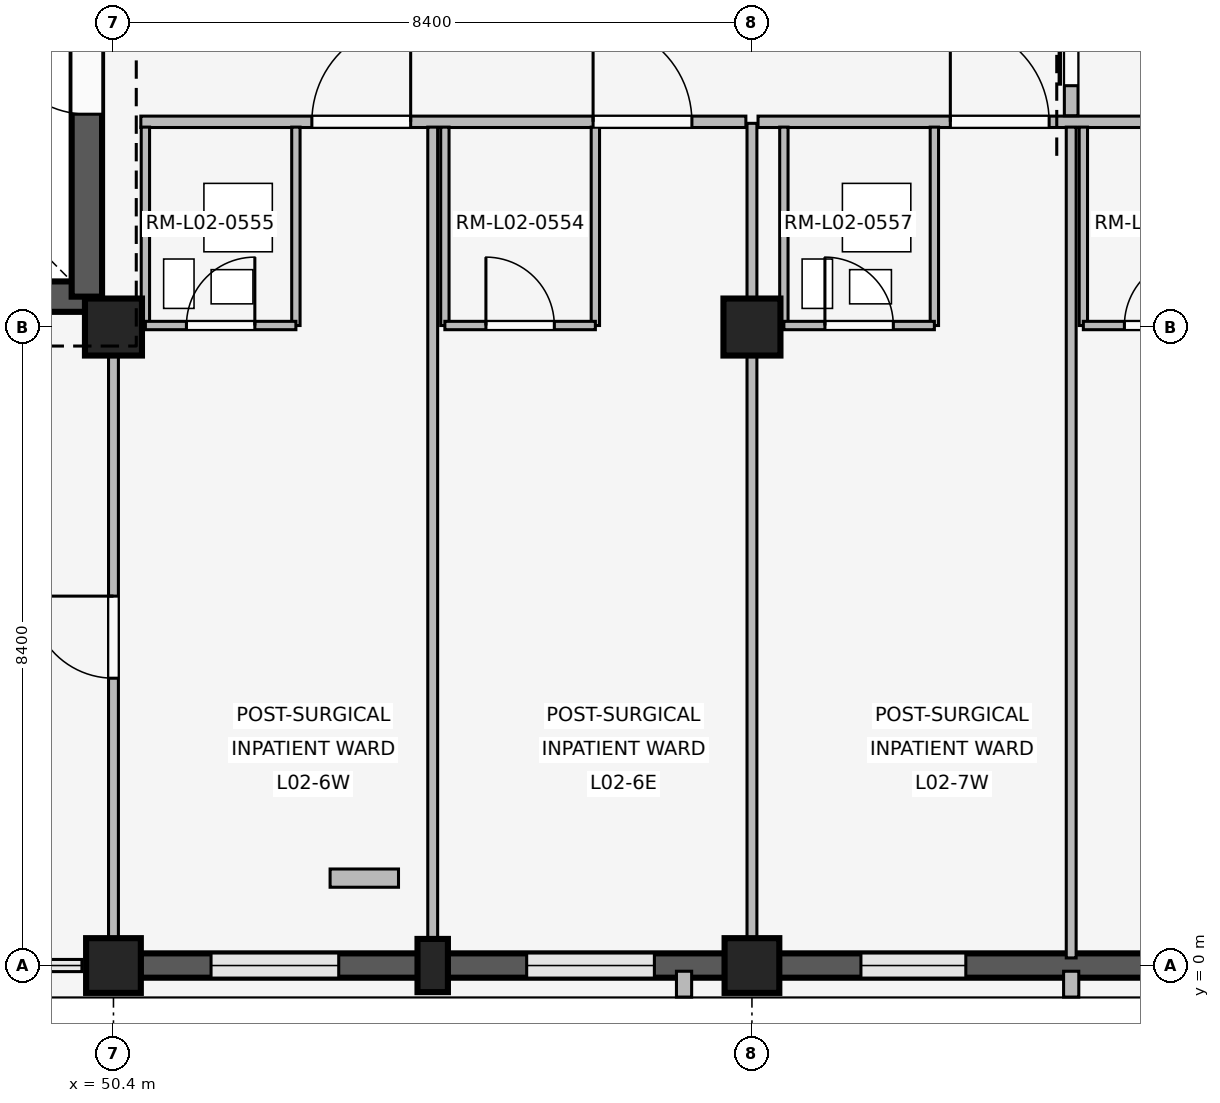
"""IFC4 building model, lengths in metres.
Left out: names, types, materials, properties, quantities, classifications, styles, units other than length and angle.
Written with IfcOpenShell. Run it as: python <this file> out.ifc"""

import sys

from ifc_helpers import new_model, si_unit, direction, frame, frame_2d, origin, origin_2d, place, context, subcontext, project, spatial, rectangle, extrude, element, fill, save


model = new_model("IFC4")
c1 = context("Model", 3, precision=1e-05, world=origin(), true_north=direction((0.0, 1.0)))
c2 = subcontext(c1, "Body", "Model", "MODEL_VIEW")
j1 = project(units=[si_unit("LENGTHUNIT", "METRE"), si_unit("PLANEANGLEUNIT", "RADIAN")], contexts=[c1])
p1 = place(None, origin())
s1 = spatial("IfcSite", under=j1, at=p1, CompositionType="ELEMENT")
p2 = place(p1, origin())
s2 = spatial("IfcBuilding", under=s1, at=p2, CompositionType="ELEMENT")
p3 = place(p2, frame((0.0, 0.0, 8.1)))
s3 = spatial("IfcBuildingStorey", under=s2, at=p3, CompositionType="ELEMENT", Elevation=8.1)
p4 = place(p3, frame((50.4, 0.0, 0.0), z_axis=(0.0, 0.0, 1.0), x_axis=(1.0, 0.0, 0.0)))
e1 = element("IfcColumn", 1, at=p4, inside=s3, PredefinedType="COLUMN", context=c2, shape_type="SweptSolid", body=[
    extrude(rectangle(XDim=0.72, YDim=0.72, at=origin_2d()), origin(), (0.0, 0.0, 1.0), 4.8),
])
p5 = place(p3, frame((50.4, 8.4, 0.0), z_axis=(0.0, 0.0, 1.0), x_axis=(1.0, 0.0, 0.0)))
e2 = element("IfcColumn", 2, at=p5, inside=s3, PredefinedType="COLUMN", context=c2, shape_type="SweptSolid", body=[
    extrude(rectangle(XDim=0.75, YDim=0.75, at=origin_2d()), origin(), (0.0, 0.0, 1.0), 4.8),
])
p6 = place(p3, frame((58.8, 0.0, 0.0), z_axis=(0.0, 0.0, 1.0), x_axis=(1.0, 0.0, 0.0)))
e3 = element("IfcColumn", 3, at=p6, inside=s3, PredefinedType="COLUMN", context=c2, shape_type="SweptSolid", body=[
    extrude(rectangle(XDim=0.72, YDim=0.72, at=origin_2d()), origin(), (0.0, 0.0, 1.0), 4.8),
])
p7 = place(p3, frame((58.8, 8.4, 0.0), z_axis=(0.0, 0.0, 1.0), x_axis=(1.0, 0.0, 0.0)))
e4 = element("IfcColumn", 4, at=p7, inside=s3, PredefinedType="COLUMN", context=c2, shape_type="SweptSolid", body=[
    extrude(rectangle(XDim=0.75, YDim=0.75, at=origin_2d()), origin(), (0.0, 0.0, 1.0), 4.8),
])
p8 = place(p3, frame((54.6, 0.0, 0.0), z_axis=(0.0, 0.0, 1.0), x_axis=(1.0, 0.0, 0.0)))
e5 = element("IfcColumn", 5, at=p8, inside=s3, PredefinedType="PILASTER", context=c2, shape_type="SweptSolid", body=[
    extrude(rectangle(XDim=0.4, YDim=0.7, at=origin_2d()), origin(), (0.0, 0.0, 1.0), 4.8),
])
p9 = place(p3, frame((58.445, 0.0, 0.0), z_axis=(0.0, 0.0, 1.0), x_axis=(-1.0, 0.0, 0.0)))
e6 = element("IfcWall", 6, at=p9, inside=s3, PredefinedType="SOLIDWALL", context=c2, shape_type="SweptSolid", body=[
    extrude(rectangle(XDim=7.69, YDim=0.32, at=frame_2d((3.845, 0.0))), origin(), (0.0, 0.0, 1.0), 3.86),
])
p10 = place(p9, frame((0.929, 0.0, 0.85)))
e7 = element("IfcOpeningElement", 7, at=p10, cuts=e6, PredefinedType="OPENING", context=c2, shape_type="SweptSolid", body=[
    extrude(rectangle(XDim=1.68, YDim=2.05, at=frame_2d((0.84, 1.025))), frame((0.0, 0.17, 0.0), z_axis=(0.0, -1.0, 0.0), x_axis=(1.0, 0.0, 0.0)), (0.0, 0.0, 1.0), 0.34),
])
p11 = place(p9, frame((5.081, 0.0, 0.85)))
e8 = element("IfcOpeningElement", 8, at=p11, cuts=e6, PredefinedType="OPENING", context=c2, shape_type="SweptSolid", body=[
    extrude(rectangle(XDim=1.68, YDim=2.05, at=frame_2d((0.84, 1.025))), frame((0.0, 0.17, 0.0), z_axis=(0.0, -1.0, 0.0), x_axis=(1.0, 0.0, 0.0)), (0.0, 0.0, 1.0), 0.34),
])
p12 = place(p3, frame((57.907, -0.075, 0.0), z_axis=(0.0, 0.0, 1.0), x_axis=(0.0, -1.0, 0.0)))
e9 = element("IfcWall", 9, at=p12, inside=s3, PredefinedType="ELEMENTEDWALL", context=c2, shape_type="SweptSolid", body=[
    extrude(rectangle(XDim=0.34, YDim=0.2, at=frame_2d((0.17, 0.0))), origin(), (0.0, 0.0, 1.0), 3.84),
])
p13 = place(p3, frame((66.845, 0.0, 0.0), z_axis=(0.0, 0.0, 1.0), x_axis=(-1.0, 0.0, 0.0)))
e10 = element("IfcWall", 10, at=p13, inside=s3, PredefinedType="SOLIDWALL", context=c2, shape_type="SweptSolid", body=[
    extrude(rectangle(XDim=7.69, YDim=0.32, at=frame_2d((3.845, 0.0))), origin(), (0.0, 0.0, 1.0), 3.86),
])
p14 = place(p13, frame((1.079, 0.0, 0.85)))
e11 = element("IfcOpeningElement", 11, at=p14, cuts=e10, PredefinedType="OPENING", context=c2, shape_type="SweptSolid", body=[
    extrude(rectangle(XDim=1.38, YDim=1.5, at=frame_2d((0.69, 0.75))), frame((0.0, 0.17, 0.0), z_axis=(0.0, -1.0, 0.0), x_axis=(1.0, 0.0, 0.0)), (0.0, 0.0, 1.0), 0.34),
])
p15 = place(p13, frame((5.231, 0.0, 0.85)))
e12 = element("IfcOpeningElement", 12, at=p15, cuts=e10, PredefinedType="OPENING", context=c2, shape_type="SweptSolid", body=[
    extrude(rectangle(XDim=1.38, YDim=1.5, at=frame_2d((0.69, 0.75))), frame((0.0, 0.17, 0.0), z_axis=(0.0, -1.0, 0.0), x_axis=(1.0, 0.0, 0.0)), (0.0, 0.0, 1.0), 0.34),
])
p16 = place(p3, frame((63.0, -0.075, 0.0), z_axis=(0.0, 0.0, 1.0), x_axis=(0.0, -1.0, 0.0)))
e13 = element("IfcWall", 13, at=p16, inside=s3, PredefinedType="ELEMENTEDWALL", context=c2, shape_type="SweptSolid", body=[
    extrude(rectangle(XDim=0.34, YDim=0.2, at=frame_2d((0.17, 0.0))), origin(), (0.0, 0.0, 1.0), 3.84),
])
p17 = place(p3, frame((42.55, 8.8, 0.0), z_axis=(0.0, 0.0, 1.0), x_axis=(1.0, 0.0, 0.0)))
e14 = element("IfcWall", 14, at=p17, inside=s3, PredefinedType="SHEAR", context=c2, shape_type="SweptSolid", body=[
    extrude(rectangle(XDim=7.5, YDim=0.4, at=frame_2d((3.75, 0.0))), origin(), (0.0, 0.0, 1.0), 4.52),
])
p18 = place(p17, frame((4.85, 0.0, 0.0)))
e15 = element("IfcOpeningElement", 15, at=p18, cuts=e14, PredefinedType="OPENING", context=c2, shape_type="SweptSolid", body=[
    extrude(rectangle(XDim=1.2, YDim=2.2, at=frame_2d((0.6, 1.1))), frame((0.0, 0.21, 0.0), z_axis=(0.0, -1.0, 0.0), x_axis=(1.0, 0.0, 0.0)), (0.0, 0.0, 1.0), 0.42),
])
p19 = place(p3, frame((50.05, 8.8, 0.0), z_axis=(0.0, 0.0, 1.0), x_axis=(0.0, 1.0, 0.0)))
e16 = element("IfcWall", 16, at=p19, inside=s3, PredefinedType="SHEAR", context=c2, shape_type="SweptSolid", body=[
    extrude(rectangle(XDim=7.55, YDim=0.4, at=frame_2d((3.775, 0.0))), origin(), (0.0, 0.0, 1.0), 4.52),
])
p20 = place(p19, frame((2.4, 0.0, 0.0)))
e17 = element("IfcOpeningElement", 17, at=p20, cuts=e16, PredefinedType="OPENING", context=c2, shape_type="SweptSolid", body=[
    extrude(rectangle(XDim=1.2, YDim=2.2, at=frame_2d((0.6, 1.1))), frame((0.0, 0.21, 0.0), z_axis=(0.0, -1.0, 0.0), x_axis=(1.0, 0.0, 0.0)), (0.0, 0.0, 1.0), 0.42),
])
p21 = place(p3, frame((50.4, 0.14, 0.0), z_axis=(0.0, 0.0, 1.0), x_axis=(0.0, 1.0, 0.0)))
e18 = element("IfcWall", 18, at=p21, inside=s3, PredefinedType="PARTITIONING", context=c2, shape_type="SweptSolid", body=[
    extrude(rectangle(XDim=8.21, YDim=0.13, at=frame_2d((4.105, 0.0))), origin(), (0.0, 0.0, 1.0), 3.84),
])
p22 = place(p21, frame((3.64, 0.0, 0.0)))
e19 = element("IfcOpeningElement", 19, at=p22, cuts=e18, PredefinedType="OPENING", context=c2, shape_type="SweptSolid", body=[
    extrude(rectangle(XDim=1.08, YDim=2.15, at=frame_2d((0.54, 1.075))), frame((0.0, 0.075, 0.0), z_axis=(0.0, -1.0, 0.0), x_axis=(1.0, 0.0, 0.0)), (0.0, 0.0, 1.0), 0.15),
])
p23 = place(p3, frame((50.76, 11.1, 0.0), z_axis=(0.0, 0.0, 1.0), x_axis=(1.0, 0.0, 0.0)))
e20 = element("IfcWall", 20, at=p23, inside=s3, PredefinedType="PARTITIONING", context=c2, shape_type="SweptSolid", body=[
    extrude(rectangle(XDim=7.96, YDim=0.15, at=frame_2d((3.98, 0.0))), origin(), (0.0, 0.0, 1.0), 3.84),
])
p24 = place(p23, frame((2.25, 0.0, 0.0)))
e21 = element("IfcOpeningElement", 21, at=p24, cuts=e20, PredefinedType="OPENING", context=c2, shape_type="SweptSolid", body=[
    extrude(rectangle(XDim=1.3, YDim=2.25, at=frame_2d((0.65, 1.125))), frame((0.0, 0.085, 0.0), z_axis=(0.0, -1.0, 0.0), x_axis=(1.0, 0.0, 0.0)), (0.0, 0.0, 1.0), 0.17),
])
p25 = place(p23, frame((5.95, 0.0, 0.0)))
e22 = element("IfcOpeningElement", 22, at=p25, cuts=e20, PredefinedType="OPENING", context=c2, shape_type="SweptSolid", body=[
    extrude(rectangle(XDim=1.3, YDim=2.25, at=frame_2d((0.65, 1.125))), frame((0.0, 0.085, 0.0), z_axis=(0.0, -1.0, 0.0), x_axis=(1.0, 0.0, 0.0)), (0.0, 0.0, 1.0), 0.17),
])
p26 = place(p3, frame((54.6, 0.1, 0.0), z_axis=(0.0, 0.0, 1.0), x_axis=(0.0, 1.0, 0.0)))
e23 = element("IfcWall", 23, at=p26, inside=s3, PredefinedType="PARTITIONING", context=c2, shape_type="SweptSolid", body=[
    extrude(rectangle(XDim=10.93, YDim=0.13, at=frame_2d((5.465, 0.0))), origin(), (0.0, 0.0, 1.0), 3.84),
])
for number, where, z_axis, x_axis in (
    (24, (50.82, 8.42, 0.0), (0.0, 0.0, 1.0), (0.0, 1.0, 0.0)),
    (25, (52.8, 8.42, 0.0), (0.0, 0.0, 1.0), (0.0, 1.0, 0.0)),
):
    element("IfcWall", number, at=place(p3, frame(where, z_axis=z_axis, x_axis=x_axis)), inside=s3, PredefinedType="PARTITIONING", context=c2, shape_type="SweptSolid", body=[
        extrude(rectangle(XDim=2.61, YDim=0.11, at=frame_2d((1.305, 0.0))), origin(), (0.0, 0.0, 1.0), 3.84),
    ])
p27 = place(p3, frame((50.82, 8.42, 0.0), z_axis=(0.0, 0.0, 1.0), x_axis=(1.0, 0.0, 0.0)))
e26 = element("IfcWall", 26, at=p27, inside=s3, PredefinedType="PARTITIONING", context=c2, shape_type="SweptSolid", body=[
    extrude(rectangle(XDim=1.98, YDim=0.11, at=frame_2d((0.99, 0.0))), origin(), (0.0, 0.0, 1.0), 3.84),
])
p28 = place(p27, frame((0.54, 0.0, 0.0)))
e27 = element("IfcOpeningElement", 27, at=p28, cuts=e26, PredefinedType="OPENING", context=c2, shape_type="SweptSolid", body=[
    extrude(rectangle(XDim=0.9, YDim=2.1, at=frame_2d((0.45, 1.05))), frame((0.0, 0.065, 0.0), z_axis=(0.0, -1.0, 0.0), x_axis=(1.0, 0.0, 0.0)), (0.0, 0.0, 1.0), 0.13),
])
for number, where, z_axis, x_axis in (
    (28, (54.76, 8.42, 0.0), (0.0, 0.0, 1.0), (0.0, 1.0, 0.0)),
    (29, (56.74, 8.42, 0.0), (0.0, 0.0, 1.0), (0.0, 1.0, 0.0)),
):
    element("IfcWall", number, at=place(p3, frame(where, z_axis=z_axis, x_axis=x_axis)), inside=s3, PredefinedType="PARTITIONING", context=c2, shape_type="SweptSolid", body=[
        extrude(rectangle(XDim=2.61, YDim=0.11, at=frame_2d((1.305, 0.0))), origin(), (0.0, 0.0, 1.0), 3.84),
    ])
p29 = place(p3, frame((54.76, 8.42, 0.0), z_axis=(0.0, 0.0, 1.0), x_axis=(1.0, 0.0, 0.0)))
e30 = element("IfcWall", 30, at=p29, inside=s3, PredefinedType="PARTITIONING", context=c2, shape_type="SweptSolid", body=[
    extrude(rectangle(XDim=1.98, YDim=0.11, at=frame_2d((0.99, 0.0))), origin(), (0.0, 0.0, 1.0), 3.84),
])
p30 = place(p29, frame((0.54, 0.0, 0.0)))
e31 = element("IfcOpeningElement", 31, at=p30, cuts=e30, PredefinedType="OPENING", context=c2, shape_type="SweptSolid", body=[
    extrude(rectangle(XDim=0.9, YDim=2.1, at=frame_2d((0.45, 1.05))), frame((0.0, 0.065, 0.0), z_axis=(0.0, -1.0, 0.0), x_axis=(1.0, 0.0, 0.0)), (0.0, 0.0, 1.0), 0.13),
])
p31 = place(p3, frame((53.25, 1.15, 0.0), z_axis=(0.0, 0.0, 1.0), x_axis=(1.0, 0.0, 0.0)))
e32 = element("IfcWall", 32, at=p31, inside=s3, PredefinedType="PLUMBINGWALL", context=c2, shape_type="SweptSolid", body=[
    extrude(rectangle(XDim=0.9, YDim=0.24, at=frame_2d((0.45, 0.0))), origin(), (0.0, 0.0, 1.0), 3.84),
])
p32 = place(p3, frame((58.8, 0.14, 0.0), z_axis=(0.0, 0.0, 1.0), x_axis=(0.0, 1.0, 0.0)))
e33 = element("IfcWall", 33, at=p32, inside=s3, PredefinedType="PARTITIONING", context=c2, shape_type="SweptSolid", body=[
    extrude(rectangle(XDim=10.94, YDim=0.13, at=frame_2d((5.47, 0.0))), origin(), (0.0, 0.0, 1.0), 3.84),
])
p33 = place(p3, frame((58.88, 11.1, 0.0), z_axis=(0.0, 0.0, 1.0), x_axis=(1.0, 0.0, 0.0)))
e34 = element("IfcWall", 34, at=p33, inside=s3, PredefinedType="PARTITIONING", context=c2, shape_type="SweptSolid", body=[
    extrude(rectangle(XDim=8.24, YDim=0.15, at=frame_2d((4.12, 0.0))), origin(), (0.0, 0.0, 1.0), 3.84),
])
p34 = place(p33, frame((2.53, 0.0, 0.0)))
e35 = element("IfcOpeningElement", 35, at=p34, cuts=e34, PredefinedType="OPENING", context=c2, shape_type="SweptSolid", body=[
    extrude(rectangle(XDim=1.3, YDim=2.25, at=frame_2d((0.65, 1.125))), frame((0.0, 0.085, 0.0), z_axis=(0.0, -1.0, 0.0), x_axis=(1.0, 0.0, 0.0)), (0.0, 0.0, 1.0), 0.17),
])
p35 = place(p33, frame((6.23, 0.0, 0.0)))
e36 = element("IfcOpeningElement", 36, at=p35, cuts=e34, PredefinedType="OPENING", context=c2, shape_type="SweptSolid", body=[
    extrude(rectangle(XDim=1.3, YDim=2.25, at=frame_2d((0.65, 1.125))), frame((0.0, 0.085, 0.0), z_axis=(0.0, -1.0, 0.0), x_axis=(1.0, 0.0, 0.0)), (0.0, 0.0, 1.0), 0.17),
])
p36 = place(p3, frame((63.0, 0.1, 0.0), z_axis=(0.0, 0.0, 1.0), x_axis=(0.0, 1.0, 0.0)))
e37 = element("IfcWall", 37, at=p36, inside=s3, PredefinedType="PARTITIONING", context=c2, shape_type="SweptSolid", body=[
    extrude(rectangle(XDim=10.93, YDim=0.13, at=frame_2d((5.465, 0.0))), origin(), (0.0, 0.0, 1.0), 3.84),
])
for number, where, z_axis, x_axis in (
    (38, (59.22, 8.42, 0.0), (0.0, 0.0, 1.0), (0.0, 1.0, 0.0)),
    (39, (61.2, 8.42, 0.0), (0.0, 0.0, 1.0), (0.0, 1.0, 0.0)),
):
    element("IfcWall", number, at=place(p3, frame(where, z_axis=z_axis, x_axis=x_axis)), inside=s3, PredefinedType="PARTITIONING", context=c2, shape_type="SweptSolid", body=[
        extrude(rectangle(XDim=2.61, YDim=0.11, at=frame_2d((1.305, 0.0))), origin(), (0.0, 0.0, 1.0), 3.84),
    ])
p37 = place(p3, frame((59.22, 8.42, 0.0), z_axis=(0.0, 0.0, 1.0), x_axis=(1.0, 0.0, 0.0)))
e40 = element("IfcWall", 40, at=p37, inside=s3, PredefinedType="PARTITIONING", context=c2, shape_type="SweptSolid", body=[
    extrude(rectangle(XDim=1.98, YDim=0.11, at=frame_2d((0.99, 0.0))), origin(), (0.0, 0.0, 1.0), 3.84),
])
p38 = place(p37, frame((0.54, 0.0, 0.0)))
e41 = element("IfcOpeningElement", 41, at=p38, cuts=e40, PredefinedType="OPENING", context=c2, shape_type="SweptSolid", body=[
    extrude(rectangle(XDim=0.9, YDim=2.1, at=frame_2d((0.45, 1.05))), frame((0.0, 0.065, 0.0), z_axis=(0.0, -1.0, 0.0), x_axis=(1.0, 0.0, 0.0)), (0.0, 0.0, 1.0), 0.13),
])
p39 = place(p3, frame((63.16, 8.42, 0.0), z_axis=(0.0, 0.0, 1.0), x_axis=(0.0, 1.0, 0.0)))
e42 = element("IfcWall", 42, at=p39, inside=s3, PredefinedType="PARTITIONING", context=c2, shape_type="SweptSolid", body=[
    extrude(rectangle(XDim=2.61, YDim=0.11, at=frame_2d((1.305, 0.0))), origin(), (0.0, 0.0, 1.0), 3.84),
])
p40 = place(p3, frame((63.16, 8.42, 0.0), z_axis=(0.0, 0.0, 1.0), x_axis=(1.0, 0.0, 0.0)))
e43 = element("IfcWall", 43, at=p40, inside=s3, PredefinedType="PARTITIONING", context=c2, shape_type="SweptSolid", body=[
    extrude(rectangle(XDim=1.98, YDim=0.11, at=frame_2d((0.99, 0.0))), origin(), (0.0, 0.0, 1.0), 3.84),
])
p41 = place(p40, frame((0.54, 0.0, 0.0)))
e44 = element("IfcOpeningElement", 44, at=p41, cuts=e43, PredefinedType="OPENING", context=c2, shape_type="SweptSolid", body=[
    extrude(rectangle(XDim=0.9, YDim=2.1, at=frame_2d((0.45, 1.05))), frame((0.0, 0.065, 0.0), z_axis=(0.0, -1.0, 0.0), x_axis=(1.0, 0.0, 0.0)), (0.0, 0.0, 1.0), 0.13),
])
p42 = place(p3, frame((63.0, 11.18, 0.0), z_axis=(0.0, 0.0, 1.0), x_axis=(0.0, 1.0, 0.0)))
e45 = element("IfcWall", 45, at=p42, inside=s3, PredefinedType="PARTITIONING", context=c2, shape_type="SweptSolid", body=[
    extrude(rectangle(XDim=2.84, YDim=0.18, at=frame_2d((1.42, 0.0))), origin(), (0.0, 0.0, 1.0), 3.84),
])
p43 = place(p42, frame((0.395, 0.0, 0.0)))
e46 = element("IfcOpeningElement", 46, at=p43, cuts=e45, PredefinedType="OPENING", context=c2, shape_type="SweptSolid", body=[
    extrude(rectangle(XDim=2.05, YDim=2.35, at=frame_2d((1.025, 1.175))), frame((0.0, 0.1, 0.0), z_axis=(0.0, -1.0, 0.0), x_axis=(1.0, 0.0, 0.0)), (0.0, 0.0, 1.0), 0.2),
])
p44 = place(p10, origin())
e47 = element("IfcWindow", 47, at=p44, inside=s3, PartitioningType="SINGLE_PANEL", PredefinedType="WINDOW", context=c2, shape_type="SweptSolid", body=[
    extrude(rectangle(XDim=1.68, YDim=2.05, at=frame_2d((0.84, 1.025))), frame((0.0, 0.03, 0.0), z_axis=(0.0, -1.0, 0.0), x_axis=(1.0, 0.0, 0.0)), (0.0, 0.0, 1.0), 0.06),
])
fill(e7, e47)
p45 = place(p11, origin())
e48 = element("IfcWindow", 48, at=p45, inside=s3, PartitioningType="SINGLE_PANEL", PredefinedType="WINDOW", context=c2, shape_type="SweptSolid", body=[
    extrude(rectangle(XDim=1.68, YDim=2.05, at=frame_2d((0.84, 1.025))), frame((0.0, 0.03, 0.0), z_axis=(0.0, -1.0, 0.0), x_axis=(1.0, 0.0, 0.0)), (0.0, 0.0, 1.0), 0.06),
])
fill(e8, e48)
p46 = place(p15, origin())
e49 = element("IfcWindow", 49, at=p46, inside=s3, PartitioningType="SINGLE_PANEL", PredefinedType="WINDOW", context=c2, shape_type="SweptSolid", body=[
    extrude(rectangle(XDim=1.38, YDim=1.5, at=frame_2d((0.69, 0.75))), frame((0.0, 0.03, 0.0), z_axis=(0.0, -1.0, 0.0), x_axis=(1.0, 0.0, 0.0)), (0.0, 0.0, 1.0), 0.06),
])
fill(e12, e49)
p47 = place(p20, origin())
e50 = element("IfcDoor", 50, at=p47, inside=s3, OperationType="SINGLE_SWING_RIGHT", PredefinedType="DOOR", context=c2, shape_type="SweptSolid", body=[
    extrude(rectangle(XDim=1.2, YDim=2.2, at=frame_2d((0.6, 1.1))), frame((0.0, 0.025, 0.0), z_axis=(0.0, -1.0, 0.0), x_axis=(1.0, 0.0, 0.0)), (0.0, 0.0, 1.0), 0.05),
])
fill(e17, e50)
p48 = place(p22, origin())
e51 = element("IfcDoor", 51, at=p48, inside=s3, OperationType="SINGLE_SWING_RIGHT", PredefinedType="DOOR", context=c2, shape_type="SweptSolid", body=[
    extrude(rectangle(XDim=1.08, YDim=2.15, at=frame_2d((0.54, 1.075))), frame((0.0, 0.025, 0.0), z_axis=(0.0, -1.0, 0.0), x_axis=(1.0, 0.0, 0.0)), (0.0, 0.0, 1.0), 0.05),
])
fill(e19, e51)
p49 = place(p24, origin())
e52 = element("IfcDoor", 52, at=p49, inside=s3, OperationType="SINGLE_SWING_RIGHT", PredefinedType="DOOR", context=c2, shape_type="SweptSolid", body=[
    extrude(rectangle(XDim=1.3, YDim=2.25, at=frame_2d((0.65, 1.125))), frame((0.0, 0.025, 0.0), z_axis=(0.0, -1.0, 0.0), x_axis=(1.0, 0.0, 0.0)), (0.0, 0.0, 1.0), 0.05),
])
fill(e21, e52)
p50 = place(p25, origin())
e53 = element("IfcDoor", 53, at=p50, inside=s3, OperationType="SINGLE_SWING_LEFT", PredefinedType="DOOR", context=c2, shape_type="SweptSolid", body=[
    extrude(rectangle(XDim=1.3, YDim=2.25, at=frame_2d((0.65, 1.125))), frame((0.0, 0.025, 0.0), z_axis=(0.0, -1.0, 0.0), x_axis=(1.0, 0.0, 0.0)), (0.0, 0.0, 1.0), 0.05),
])
fill(e22, e53)
p51 = place(p28, origin())
e54 = element("IfcDoor", 54, at=p51, inside=s3, OperationType="SINGLE_SWING_RIGHT", PredefinedType="DOOR", context=c2, shape_type="SweptSolid", body=[
    extrude(rectangle(XDim=0.9, YDim=2.1, at=frame_2d((0.45, 1.05))), frame((0.0, 0.025, 0.0), z_axis=(0.0, -1.0, 0.0), x_axis=(1.0, 0.0, 0.0)), (0.0, 0.0, 1.0), 0.05),
])
fill(e27, e54)
p52 = place(p30, origin())
e55 = element("IfcDoor", 55, at=p52, inside=s3, OperationType="SINGLE_SWING_LEFT", PredefinedType="DOOR", context=c2, shape_type="SweptSolid", body=[
    extrude(rectangle(XDim=0.9, YDim=2.1, at=frame_2d((0.45, 1.05))), frame((0.0, 0.025, 0.0), z_axis=(0.0, -1.0, 0.0), x_axis=(1.0, 0.0, 0.0)), (0.0, 0.0, 1.0), 0.05),
])
fill(e31, e55)
p53 = place(p34, origin())
e56 = element("IfcDoor", 56, at=p53, inside=s3, OperationType="SINGLE_SWING_LEFT", PredefinedType="DOOR", context=c2, shape_type="SweptSolid", body=[
    extrude(rectangle(XDim=1.3, YDim=2.25, at=frame_2d((0.65, 1.125))), frame((0.0, 0.025, 0.0), z_axis=(0.0, -1.0, 0.0), x_axis=(1.0, 0.0, 0.0)), (0.0, 0.0, 1.0), 0.05),
])
fill(e35, e56)
p54 = place(p38, origin())
e57 = element("IfcDoor", 57, at=p54, inside=s3, OperationType="SINGLE_SWING_LEFT", PredefinedType="DOOR", context=c2, shape_type="SweptSolid", body=[
    extrude(rectangle(XDim=0.9, YDim=2.1, at=frame_2d((0.45, 1.05))), frame((0.0, 0.025, 0.0), z_axis=(0.0, -1.0, 0.0), x_axis=(1.0, 0.0, 0.0)), (0.0, 0.0, 1.0), 0.05),
])
fill(e41, e57)
p55 = place(p41, origin())
e58 = element("IfcDoor", 58, at=p55, inside=s3, OperationType="SINGLE_SWING_RIGHT", PredefinedType="DOOR", context=c2, shape_type="SweptSolid", body=[
    extrude(rectangle(XDim=0.9, YDim=2.1, at=frame_2d((0.45, 1.05))), frame((0.0, 0.025, 0.0), z_axis=(0.0, -1.0, 0.0), x_axis=(1.0, 0.0, 0.0)), (0.0, 0.0, 1.0), 0.05),
])
fill(e44, e58)
p56 = place(p43, origin())
e59 = element("IfcDoor", 59, at=p56, inside=s3, OperationType="SLIDING_TO_LEFT", PredefinedType="DOOR", context=c2, shape_type="SweptSolid", body=[
    extrude(rectangle(XDim=2.05, YDim=2.35, at=frame_2d((1.025, 1.175))), frame((0.0, 0.025, 0.0), z_axis=(0.0, -1.0, 0.0), x_axis=(1.0, 0.0, 0.0)), (0.0, 0.0, 1.0), 0.05),
])
fill(e46, e59)
save(model, sys.argv[1])
